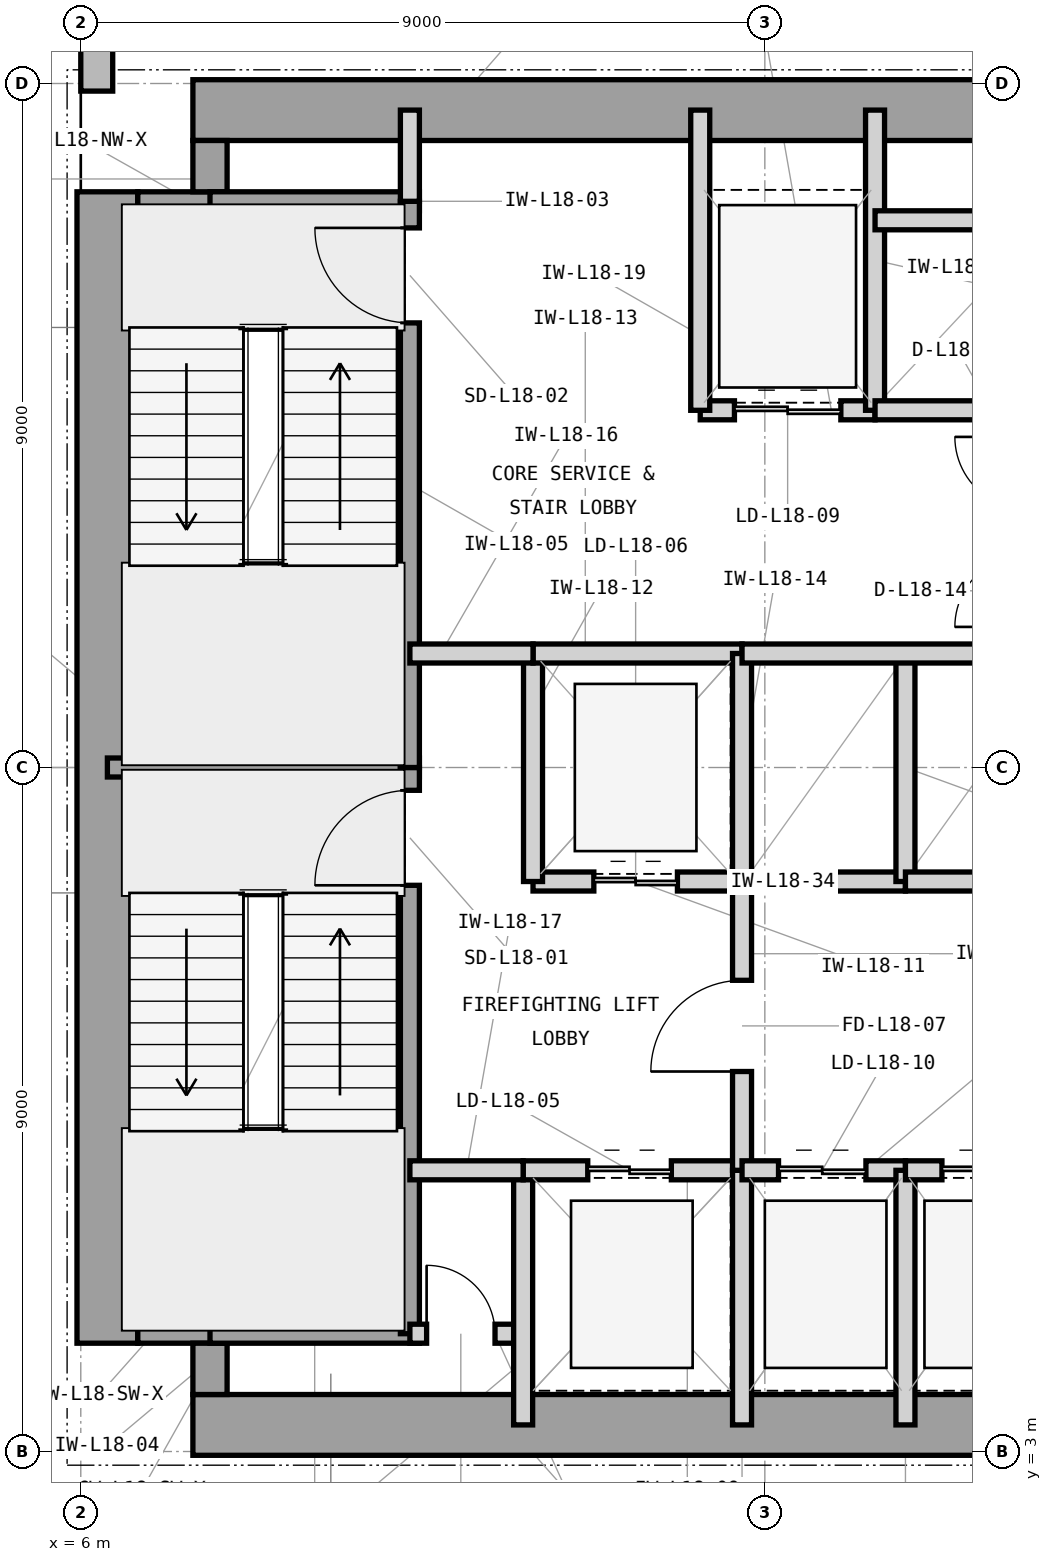
"""IFC4 building model, lengths in metres.
Left out: names, types, materials, properties, quantities, classifications, styles, units other than length and angle.
Written with IfcOpenShell. Run it as: python <this file> out.ifc"""

import sys

from ifc_helpers import new_model, si_unit, direction, frame, frame_2d, origin, place, context, subcontext, project, spatial, rectangle, extrude, element, fill, save


model = new_model("IFC4")
c1 = context("Model", 3, precision=1e-05, world=origin(), true_north=direction((0.0, 1.0)))
c2 = subcontext(c1, "Body", "Model", "MODEL_VIEW")
j1 = project(units=[si_unit("LENGTHUNIT", "METRE"), si_unit("PLANEANGLEUNIT", "RADIAN")], contexts=[c1])
p1 = place(None, origin())
s1 = spatial("IfcSite", under=j1, at=p1, CompositionType="ELEMENT")
p2 = place(p1, origin())
s2 = spatial("IfcBuilding", under=s1, at=p2, CompositionType="ELEMENT")
p3 = place(p2, frame((0.0, 0.0, 80.4)))
s3 = spatial("IfcBuildingStorey", under=s2, at=p3, CompositionType="ELEMENT", Elevation=80.4)
p4 = place(p3, frame((7.475, 3.35, 0.0), z_axis=(0.0, 0.0, 1.0), x_axis=(1.0, 0.0, 0.0)))
e1 = element("IfcWall", 1, at=p4, inside=s3, PredefinedType="SHEAR", context=c2, shape_type="SweptSolid", body=[
    extrude(rectangle(XDim=16.575, YDim=0.8, at=frame_2d((8.288, 0.0))), origin(), (0.0, 0.0, 1.0), 4.2),
])
p5 = place(p3, frame((6.35, 4.425, 0.0), z_axis=(0.0, 0.0, 1.0), x_axis=(0.0, 1.0, 0.0)))
e2 = element("IfcWall", 2, at=p5, inside=s3, PredefinedType="SHEAR", context=c2, shape_type="SweptSolid", body=[
    extrude(rectangle(XDim=15.15, YDim=0.8, at=frame_2d((7.575, 0.0))), origin(), (0.0, 0.0, 1.0), 4.2),
])
p6 = place(p3, frame((7.475, 20.65, 0.0), z_axis=(0.0, 0.0, 1.0), x_axis=(1.0, 0.0, 0.0)))
e3 = element("IfcWall", 3, at=p6, inside=s3, PredefinedType="SHEAR", context=c2, shape_type="SweptSolid", body=[
    extrude(rectangle(XDim=12.325, YDim=0.8, at=frame_2d((6.163, 0.0))), origin(), (0.0, 0.0, 1.0), 4.2),
])
p7 = place(p3, frame((6.75, 4.65, 0.0), z_axis=(0.0, 0.0, 1.0), x_axis=(1.0, 0.0, 0.0)))
e4 = element("IfcWall", 4, at=p7, inside=s3, PredefinedType="SHEAR", context=c2, shape_type="SweptSolid", body=[
    extrude(rectangle(XDim=1.175, YDim=0.45, at=frame_2d((0.587, 0.0))), origin(), (0.0, 0.0, 1.0), 4.2),
])
p8 = place(p3, frame((7.7, 3.75, 0.0), z_axis=(0.0, 0.0, 1.0), x_axis=(0.0, 1.0, 0.0)))
e5 = element("IfcWall", 5, at=p8, inside=s3, PredefinedType="SHEAR", context=c2, shape_type="SweptSolid", body=[
    extrude(rectangle(XDim=0.675, YDim=0.45, at=frame_2d((0.337, 0.0))), origin(), (0.0, 0.0, 1.0), 4.2),
])
p9 = place(p3, frame((6.75, 19.35, 0.0), z_axis=(0.0, 0.0, 1.0), x_axis=(1.0, 0.0, 0.0)))
e6 = element("IfcWall", 6, at=p9, inside=s3, PredefinedType="SHEAR", context=c2, shape_type="SweptSolid", body=[
    extrude(rectangle(XDim=1.175, YDim=0.45, at=frame_2d((0.587, 0.0))), origin(), (0.0, 0.0, 1.0), 4.2),
])
p10 = place(p3, frame((7.7, 19.575, 0.0), z_axis=(0.0, 0.0, 1.0), x_axis=(0.0, 1.0, 0.0)))
e7 = element("IfcWall", 7, at=p10, inside=s3, PredefinedType="SHEAR", context=c2, shape_type="SweptSolid", body=[
    extrude(rectangle(XDim=0.675, YDim=0.45, at=frame_2d((0.337, 0.0))), origin(), (0.0, 0.0, 1.0), 4.2),
])
p11 = place(p3, frame((6.21, 49.4, 0.0), z_axis=(0.0, 0.0, 1.0), x_axis=(0.0, -1.0, 0.0)))
e8 = element("IfcWall", 8, at=p11, inside=s3, PredefinedType="STANDARD", context=c2, shape_type="SweptSolid", body=[
    extrude(rectangle(XDim=28.5, YDim=0.42, at=frame_2d((14.25, 0.0))), origin(), (0.0, 0.0, 1.0), 3.92),
])
p12 = place(p11, frame((15.225, 0.0, 0.85)))
e9 = element("IfcOpeningElement", 9, at=p12, cuts=e8, PredefinedType="OPENING", context=c2, shape_type="SweptSolid", body=[
    extrude(rectangle(XDim=2.8, YDim=2.45, at=frame_2d((1.4, 1.225))), frame((0.0, 0.22, 0.0), z_axis=(0.0, -1.0, 0.0), x_axis=(1.0, 0.0, 0.0)), (0.0, 0.0, 1.0), 0.44),
])
p13 = place(p11, frame((5.236, 0.0, 0.85)))
e10 = element("IfcOpeningElement", 10, at=p13, cuts=e8, PredefinedType="OPENING", context=c2, shape_type="SweptSolid", body=[
    extrude(rectangle(XDim=1.2, YDim=2.45, at=frame_2d((0.6, 1.225))), frame((0.0, 0.22, 0.0), z_axis=(0.0, -1.0, 0.0), x_axis=(1.0, 0.0, 0.0)), (0.0, 0.0, 1.0), 0.44),
])
p14 = place(p3, frame((6.35, 12.0, 0.0), z_axis=(0.0, 0.0, 1.0), x_axis=(1.0, 0.0, 0.0)))
e11 = element("IfcWall", 11, at=p14, inside=s3, PredefinedType="SHEAR", context=c2, shape_type="SweptSolid", body=[
    extrude(rectangle(XDim=4.105, YDim=0.25, at=frame_2d((2.052, 0.0))), origin(), (0.0, 0.0, 1.0), 4.2),
])
for number, where, z_axis, x_axis in (
    (12, (7.7, 4.55, 0.0), (0.0, 0.0, 1.0), (1.0, 0.0, 0.0)),
    (13, (7.7, 19.45, 0.0), (0.0, 0.0, 1.0), (1.0, 0.0, 0.0)),
):
    element("IfcWall", number, at=place(p3, frame(where, z_axis=z_axis, x_axis=x_axis)), inside=s3, PredefinedType="SHEAR", context=c2, shape_type="SweptSolid", body=[
        extrude(rectangle(XDim=2.755, YDim=0.25, at=frame_2d((1.377, 0.0))), origin(), (0.0, 0.0, 1.0), 4.2),
    ])
p15 = place(p3, frame((10.33, 4.55, 0.0), z_axis=(0.0, 0.0, 1.0), x_axis=(0.0, 1.0, 0.0)))
e14 = element("IfcWall", 14, at=p15, inside=s3, PredefinedType="SHEAR", context=c2, shape_type="SweptSolid", body=[
    extrude(rectangle(XDim=7.45, YDim=0.25, at=frame_2d((3.725, 0.0))), origin(), (0.0, 0.0, 1.0), 4.2),
])
p16 = place(p15, frame((5.9, 0.0, 0.0)))
e15 = element("IfcOpeningElement", 15, at=p16, cuts=e14, PredefinedType="OPENING", context=c2, shape_type="SweptSolid", body=[
    extrude(rectangle(XDim=1.25, YDim=2.2, at=frame_2d((0.625, 1.1))), frame((0.0, 0.135, 0.0), z_axis=(0.0, -1.0, 0.0), x_axis=(1.0, 0.0, 0.0)), (0.0, 0.0, 1.0), 0.27),
])
p17 = place(p3, frame((10.33, 12.0, 0.0), z_axis=(0.0, 0.0, 1.0), x_axis=(0.0, 1.0, 0.0)))
e16 = element("IfcWall", 16, at=p17, inside=s3, PredefinedType="SHEAR", context=c2, shape_type="SweptSolid", body=[
    extrude(rectangle(XDim=7.45, YDim=0.25, at=frame_2d((3.725, 0.0))), origin(), (0.0, 0.0, 1.0), 4.2),
])
p18 = place(p17, frame((5.85, 0.0, 0.0)))
e17 = element("IfcOpeningElement", 17, at=p18, cuts=e16, PredefinedType="OPENING", context=c2, shape_type="SweptSolid", body=[
    extrude(rectangle(XDim=1.25, YDim=2.2, at=frame_2d((0.625, 1.1))), frame((0.0, 0.135, 0.0), z_axis=(0.0, -1.0, 0.0), x_axis=(1.0, 0.0, 0.0)), (0.0, 0.0, 1.0), 0.27),
])
p19 = place(p3, frame((10.33, 4.55, 0.0), z_axis=(0.0, 0.0, 1.0), x_axis=(1.0, 0.0, 0.0)))
e18 = element("IfcWall", 18, at=p19, inside=s3, PredefinedType="PARTITIONING", context=c2, shape_type="SweptSolid", body=[
    extrude(rectangle(XDim=1.49, YDim=0.25, at=frame_2d((0.745, 0.0))), origin(), (0.0, 0.0, 1.0), 3.91),
])
p20 = place(p19, frame((0.22, 0.0, 0.0)))
e19 = element("IfcOpeningElement", 19, at=p20, cuts=e18, PredefinedType="OPENING", context=c2, shape_type="SweptSolid", body=[
    extrude(rectangle(XDim=0.9, YDim=2.1, at=frame_2d((0.45, 1.05))), frame((0.0, 0.135, 0.0), z_axis=(0.0, -1.0, 0.0), x_axis=(1.0, 0.0, 0.0)), (0.0, 0.0, 1.0), 0.27),
])
p21 = place(p3, frame((11.82, 3.35, 0.0), z_axis=(0.0, 0.0, 1.0), x_axis=(0.0, 1.0, 0.0)))
e20 = element("IfcWall", 20, at=p21, inside=s3, PredefinedType="PARTITIONING", context=c2, shape_type="SweptSolid", body=[
    extrude(rectangle(XDim=3.35, YDim=0.25, at=frame_2d((1.675, 0.0))), origin(), (0.0, 0.0, 1.0), 3.91),
])
p22 = place(p3, frame((10.33, 19.45, 0.0), z_axis=(0.0, 0.0, 1.0), x_axis=(0.0, 1.0, 0.0)))
e21 = element("IfcWall", 21, at=p22, inside=s3, PredefinedType="PARTITIONING", context=c2, shape_type="SweptSolid", body=[
    extrude(rectangle(XDim=1.2, YDim=0.25, at=frame_2d((0.6, 0.0))), origin(), (0.0, 0.0, 1.0), 2.983),
])
p23 = place(p3, frame((11.82, 6.7, 0.0), z_axis=(0.0, 0.0, 1.0), x_axis=(1.0, 0.0, 0.0)))
e22 = element("IfcWall", 22, at=p23, inside=s3, PredefinedType="PARTITIONING", context=c2, shape_type="SweptSolid", body=[
    extrude(rectangle(XDim=2.88, YDim=0.25, at=frame_2d((1.44, 0.0))), origin(), (0.0, 0.0, 1.0), 3.293),
])
p24 = place(p23, frame((0.85, 0.0, 0.0)))
e23 = element("IfcOpeningElement", 23, at=p24, cuts=e22, PredefinedType="OPENING", context=c2, shape_type="SweptSolid", body=[
    extrude(rectangle(XDim=1.1, YDim=2.25, at=frame_2d((0.55, 1.125))), frame((0.0, 0.135, 0.0), z_axis=(0.0, -1.0, 0.0), x_axis=(1.0, 0.0, 0.0)), (0.0, 0.0, 1.0), 0.27),
])
p25 = place(p3, frame((14.7, 3.35, 0.0), z_axis=(0.0, 0.0, 1.0), x_axis=(0.0, 1.0, 0.0)))
e24 = element("IfcWall", 24, at=p25, inside=s3, PredefinedType="PARTITIONING", context=c2, shape_type="SweptSolid", body=[
    extrude(rectangle(XDim=3.35, YDim=0.25, at=frame_2d((1.675, 0.0))), origin(), (0.0, 0.0, 1.0), 3.91),
])
p26 = place(p3, frame((11.95, 10.5, 0.0), z_axis=(0.0, 0.0, 1.0), x_axis=(1.0, 0.0, 0.0)))
e25 = element("IfcWall", 25, at=p26, inside=s3, PredefinedType="PARTITIONING", context=c2, shape_type="SweptSolid", body=[
    extrude(rectangle(XDim=2.75, YDim=0.25, at=frame_2d((1.375, 0.0))), origin(), (0.0, 0.0, 1.0), 3.293),
])
p27 = place(p26, frame((0.8, 0.0, 0.0)))
e26 = element("IfcOpeningElement", 26, at=p27, cuts=e25, PredefinedType="OPENING", context=c2, shape_type="SweptSolid", body=[
    extrude(rectangle(XDim=1.1, YDim=2.25, at=frame_2d((0.55, 1.125))), frame((0.0, 0.135, 0.0), z_axis=(0.0, -1.0, 0.0), x_axis=(1.0, 0.0, 0.0)), (0.0, 0.0, 1.0), 0.27),
])
p28 = place(p3, frame((11.95, 10.5, 0.0), z_axis=(0.0, 0.0, 1.0), x_axis=(0.0, 1.0, 0.0)))
e27 = element("IfcWall", 27, at=p28, inside=s3, PredefinedType="PARTITIONING", context=c2, shape_type="SweptSolid", body=[
    extrude(rectangle(XDim=3.0, YDim=0.25, at=frame_2d((1.5, 0.0))), origin(), (0.0, 0.0, 1.0), 3.91),
])
p29 = place(p3, frame((11.95, 13.5, 0.0), z_axis=(0.0, 0.0, 1.0), x_axis=(1.0, 0.0, 0.0)))
e28 = element("IfcWall", 28, at=p29, inside=s3, PredefinedType="PARTITIONING", context=c2, shape_type="SweptSolid", body=[
    extrude(rectangle(XDim=2.75, YDim=0.25, at=frame_2d((1.375, 0.0))), origin(), (0.0, 0.0, 1.0), 3.293),
])
p30 = place(p3, frame((14.7, 10.5, 0.0), z_axis=(0.0, 0.0, 1.0), x_axis=(0.0, 1.0, 0.0)))
e29 = element("IfcWall", 29, at=p30, inside=s3, PredefinedType="PARTITIONING", context=c2, shape_type="SweptSolid", body=[
    extrude(rectangle(XDim=3.0, YDim=0.25, at=frame_2d((1.5, 0.0))), origin(), (0.0, 0.0, 1.0), 3.91),
])
p31 = place(p3, frame((14.7, 6.7, 0.0), z_axis=(0.0, 0.0, 1.0), x_axis=(0.0, 1.0, 0.0)))
e30 = element("IfcWall", 30, at=p31, inside=s3, PredefinedType="PARTITIONING", context=c2, shape_type="SweptSolid", body=[
    extrude(rectangle(XDim=3.8, YDim=0.25, at=frame_2d((1.9, 0.0))), origin(), (0.0, 0.0, 1.0), 3.91),
])
p32 = place(p31, frame((1.3, 0.0, 0.0)))
e31 = element("IfcOpeningElement", 31, at=p32, cuts=e30, PredefinedType="OPENING", context=c2, shape_type="SweptSolid", body=[
    extrude(rectangle(XDim=1.2, YDim=2.2, at=frame_2d((0.6, 1.1))), frame((0.0, 0.135, 0.0), z_axis=(0.0, -1.0, 0.0), x_axis=(1.0, 0.0, 0.0)), (0.0, 0.0, 1.0), 0.27),
])
p33 = place(p3, frame((10.33, 13.5, 0.0), z_axis=(0.0, 0.0, 1.0), x_axis=(1.0, 0.0, 0.0)))
e32 = element("IfcWall", 32, at=p33, inside=s3, PredefinedType="PARTITIONING", context=c2, shape_type="SweptSolid", body=[
    extrude(rectangle(XDim=1.62, YDim=0.25, at=frame_2d((0.81, 0.0))), origin(), (0.0, 0.0, 1.0), 3.293),
])
p34 = place(p3, frame((10.33, 6.7, 0.0), z_axis=(0.0, 0.0, 1.0), x_axis=(1.0, 0.0, 0.0)))
e33 = element("IfcWall", 33, at=p34, inside=s3, PredefinedType="PARTITIONING", context=c2, shape_type="SweptSolid", body=[
    extrude(rectangle(XDim=1.49, YDim=0.25, at=frame_2d((0.745, 0.0))), origin(), (0.0, 0.0, 1.0), 3.293),
])
p35 = place(p3, frame((14.15, 16.7, 0.0), z_axis=(0.0, 0.0, 1.0), x_axis=(1.0, 0.0, 0.0)))
e34 = element("IfcWall", 34, at=p35, inside=s3, PredefinedType="PARTITIONING", context=c2, shape_type="SweptSolid", body=[
    extrude(rectangle(XDim=2.3, YDim=0.25, at=frame_2d((1.15, 0.0))), origin(), (0.0, 0.0, 1.0), 3.293),
])
p36 = place(p35, frame((0.45, 0.0, 0.0)))
e35 = element("IfcOpeningElement", 35, at=p36, cuts=e34, PredefinedType="OPENING", context=c2, shape_type="SweptSolid", body=[
    extrude(rectangle(XDim=1.4, YDim=2.35, at=frame_2d((0.7, 1.175))), frame((0.0, 0.135, 0.0), z_axis=(0.0, -1.0, 0.0), x_axis=(1.0, 0.0, 0.0)), (0.0, 0.0, 1.0), 0.27),
])
for number, where, z_axis, x_axis in (
    (36, (14.15, 16.7, 0.0), (0.0, 0.0, 1.0), (0.0, 1.0, 0.0)),
    (37, (16.45, 16.7, 0.0), (0.0, 0.0, 1.0), (0.0, 1.0, 0.0)),
):
    element("IfcWall", number, at=place(p3, frame(where, z_axis=z_axis, x_axis=x_axis)), inside=s3, PredefinedType="PARTITIONING", context=c2, shape_type="SweptSolid", body=[
        extrude(rectangle(XDim=3.95, YDim=0.25, at=frame_2d((1.975, 0.0))), origin(), (0.0, 0.0, 1.0), 3.91),
    ])
p37 = place(p3, frame((16.45, 16.7, 0.0), z_axis=(0.0, 0.0, 1.0), x_axis=(1.0, 0.0, 0.0)))
e38 = element("IfcWall", 38, at=p37, inside=s3, PredefinedType="PARTITIONING", context=c2, shape_type="SweptSolid", body=[
    extrude(rectangle(XDim=2.3, YDim=0.25, at=frame_2d((1.15, 0.0))), origin(), (0.0, 0.0, 1.0), 3.293),
])
p38 = place(p3, frame((16.45, 19.2, 0.0), z_axis=(0.0, 0.0, 1.0), x_axis=(1.0, 0.0, 0.0)))
e39 = element("IfcWall", 39, at=p38, inside=s3, PredefinedType="PARTITIONING", context=c2, shape_type="SweptSolid", body=[
    extrude(rectangle(XDim=7.2, YDim=0.25, at=frame_2d((3.6, 0.0))), origin(), (0.0, 0.0, 1.0), 3.91),
])
p39 = place(p3, frame((14.7, 6.7, 0.0), z_axis=(0.0, 0.0, 1.0), x_axis=(1.0, 0.0, 0.0)))
e40 = element("IfcWall", 40, at=p39, inside=s3, PredefinedType="PARTITIONING", context=c2, shape_type="SweptSolid", body=[
    extrude(rectangle(XDim=2.15, YDim=0.25, at=frame_2d((1.075, 0.0))), origin(), (0.0, 0.0, 1.0), 3.293),
])
p40 = place(p39, frame((0.48, 0.0, 0.0)))
e41 = element("IfcOpeningElement", 41, at=p40, cuts=e40, PredefinedType="OPENING", context=c2, shape_type="SweptSolid", body=[
    extrude(rectangle(XDim=1.15, YDim=2.25, at=frame_2d((0.575, 1.125))), frame((0.0, 0.135, 0.0), z_axis=(0.0, -1.0, 0.0), x_axis=(1.0, 0.0, 0.0)), (0.0, 0.0, 1.0), 0.27),
])
p41 = place(p3, frame((16.85, 3.35, 0.0), z_axis=(0.0, 0.0, 1.0), x_axis=(0.0, 1.0, 0.0)))
e42 = element("IfcWall", 42, at=p41, inside=s3, PredefinedType="PARTITIONING", context=c2, shape_type="SweptSolid", body=[
    extrude(rectangle(XDim=3.35, YDim=0.25, at=frame_2d((1.675, 0.0))), origin(), (0.0, 0.0, 1.0), 3.91),
])
p42 = place(p3, frame((16.85, 6.7, 0.0), z_axis=(0.0, 0.0, 1.0), x_axis=(1.0, 0.0, 0.0)))
e43 = element("IfcWall", 43, at=p42, inside=s3, PredefinedType="PARTITIONING", context=c2, shape_type="SweptSolid", body=[
    extrude(rectangle(XDim=2.1, YDim=0.25, at=frame_2d((1.05, 0.0))), origin(), (0.0, 0.0, 1.0), 3.293),
])
p43 = place(p42, frame((0.48, 0.0, 0.0)))
e44 = element("IfcOpeningElement", 44, at=p43, cuts=e43, PredefinedType="OPENING", context=c2, shape_type="SweptSolid", body=[
    extrude(rectangle(XDim=1.15, YDim=2.25, at=frame_2d((0.575, 1.125))), frame((0.0, 0.135, 0.0), z_axis=(0.0, -1.0, 0.0), x_axis=(1.0, 0.0, 0.0)), (0.0, 0.0, 1.0), 0.27),
])
p44 = place(p3, frame((14.7, 10.5, 0.0), z_axis=(0.0, 0.0, 1.0), x_axis=(1.0, 0.0, 0.0)))
e45 = element("IfcWall", 45, at=p44, inside=s3, PredefinedType="PARTITIONING", context=c2, shape_type="SweptSolid", body=[
    extrude(rectangle(XDim=2.15, YDim=0.25, at=frame_2d((1.075, 0.0))), origin(), (0.0, 0.0, 1.0), 3.293),
])
p45 = place(p3, frame((16.85, 10.5, 0.0), z_axis=(0.0, 0.0, 1.0), x_axis=(0.0, 1.0, 0.0)))
e46 = element("IfcWall", 46, at=p45, inside=s3, PredefinedType="PARTITIONING", context=c2, shape_type="SweptSolid", body=[
    extrude(rectangle(XDim=3.0, YDim=0.25, at=frame_2d((1.5, 0.0))), origin(), (0.0, 0.0, 1.0), 3.91),
])
p46 = place(p3, frame((16.85, 10.5, 0.0), z_axis=(0.0, 0.0, 1.0), x_axis=(1.0, 0.0, 0.0)))
e47 = element("IfcWall", 47, at=p46, inside=s3, PredefinedType="PARTITIONING", context=c2, shape_type="SweptSolid", body=[
    extrude(rectangle(XDim=2.1, YDim=0.25, at=frame_2d((1.05, 0.0))), origin(), (0.0, 0.0, 1.0), 3.293),
])
p47 = place(p3, frame((14.7, 13.5, 0.0), z_axis=(0.0, 0.0, 1.0), x_axis=(1.0, 0.0, 0.0)))
e48 = element("IfcWall", 48, at=p47, inside=s3, PredefinedType="PARTITIONING", context=c2, shape_type="SweptSolid", body=[
    extrude(rectangle(XDim=8.95, YDim=0.25, at=frame_2d((4.475, 0.0))), origin(), (0.0, 0.0, 1.0), 3.293),
])
p48 = place(p16, origin())
e49 = element("IfcDoor", 49, at=p48, inside=s3, OperationType="SINGLE_SWING_LEFT", PredefinedType="DOOR", context=c2, shape_type="SweptSolid", body=[
    extrude(rectangle(XDim=1.25, YDim=2.2, at=frame_2d((0.625, 1.1))), frame((0.0, 0.025, 0.0), z_axis=(0.0, -1.0, 0.0), x_axis=(1.0, 0.0, 0.0)), (0.0, 0.0, 1.0), 0.05),
])
fill(e15, e49)
p49 = place(p18, origin())
e50 = element("IfcDoor", 50, at=p49, inside=s3, OperationType="SINGLE_SWING_RIGHT", PredefinedType="DOOR", context=c2, shape_type="SweptSolid", body=[
    extrude(rectangle(XDim=1.25, YDim=2.2, at=frame_2d((0.625, 1.1))), frame((0.0, 0.025, 0.0), z_axis=(0.0, -1.0, 0.0), x_axis=(1.0, 0.0, 0.0)), (0.0, 0.0, 1.0), 0.05),
])
fill(e17, e50)
p50 = place(p20, origin())
e51 = element("IfcDoor", 51, at=p50, inside=s3, OperationType="SINGLE_SWING_LEFT", PredefinedType="TRAPDOOR", context=c2, shape_type="SweptSolid", body=[
    extrude(rectangle(XDim=0.9, YDim=2.1, at=frame_2d((0.45, 1.05))), frame((0.0, 0.025, 0.0), z_axis=(0.0, -1.0, 0.0), x_axis=(1.0, 0.0, 0.0)), (0.0, 0.0, 1.0), 0.05),
])
fill(e19, e51)
p51 = place(p24, origin())
e52 = element("IfcDoor", 52, at=p51, inside=s3, OperationType="DOUBLE_DOOR_SLIDING", PredefinedType="DOOR", context=c2, shape_type="SweptSolid", body=[
    extrude(rectangle(XDim=1.1, YDim=2.25, at=frame_2d((0.55, 1.125))), frame((0.0, 0.025, 0.0), z_axis=(0.0, -1.0, 0.0), x_axis=(1.0, 0.0, 0.0)), (0.0, 0.0, 1.0), 0.05),
])
fill(e23, e52)
p52 = place(p27, origin())
e53 = element("IfcDoor", 53, at=p52, inside=s3, OperationType="DOUBLE_DOOR_SLIDING", PredefinedType="DOOR", context=c2, shape_type="SweptSolid", body=[
    extrude(rectangle(XDim=1.1, YDim=2.25, at=frame_2d((0.55, 1.125))), frame((0.0, 0.025, 0.0), z_axis=(0.0, -1.0, 0.0), x_axis=(1.0, 0.0, 0.0)), (0.0, 0.0, 1.0), 0.05),
])
fill(e26, e53)
p53 = place(p32, origin())
e54 = element("IfcDoor", 54, at=p53, inside=s3, OperationType="SINGLE_SWING_LEFT", PredefinedType="DOOR", context=c2, shape_type="SweptSolid", body=[
    extrude(rectangle(XDim=1.2, YDim=2.2, at=frame_2d((0.6, 1.1))), frame((0.0, 0.025, 0.0), z_axis=(0.0, -1.0, 0.0), x_axis=(1.0, 0.0, 0.0)), (0.0, 0.0, 1.0), 0.05),
])
fill(e31, e54)
p54 = place(p36, origin())
e55 = element("IfcDoor", 55, at=p54, inside=s3, OperationType="DOUBLE_DOOR_SLIDING", PredefinedType="DOOR", context=c2, shape_type="SweptSolid", body=[
    extrude(rectangle(XDim=1.4, YDim=2.35, at=frame_2d((0.7, 1.175))), frame((0.0, 0.025, 0.0), z_axis=(0.0, -1.0, 0.0), x_axis=(1.0, 0.0, 0.0)), (0.0, 0.0, 1.0), 0.05),
])
fill(e35, e55)
p55 = place(p40, origin())
e56 = element("IfcDoor", 56, at=p55, inside=s3, OperationType="DOUBLE_DOOR_SLIDING", PredefinedType="DOOR", context=c2, shape_type="SweptSolid", body=[
    extrude(rectangle(XDim=1.15, YDim=2.25, at=frame_2d((0.575, 1.125))), frame((0.0, 0.025, 0.0), z_axis=(0.0, -1.0, 0.0), x_axis=(1.0, 0.0, 0.0)), (0.0, 0.0, 1.0), 0.05),
])
fill(e41, e56)
p56 = place(p43, origin())
e57 = element("IfcDoor", 57, at=p56, inside=s3, OperationType="DOUBLE_DOOR_SLIDING", PredefinedType="DOOR", context=c2, shape_type="SweptSolid", body=[
    extrude(rectangle(XDim=1.15, YDim=2.25, at=frame_2d((0.575, 1.125))), frame((0.0, 0.025, 0.0), z_axis=(0.0, -1.0, 0.0), x_axis=(1.0, 0.0, 0.0)), (0.0, 0.0, 1.0), 0.05),
])
fill(e44, e57)
save(model, sys.argv[1])
